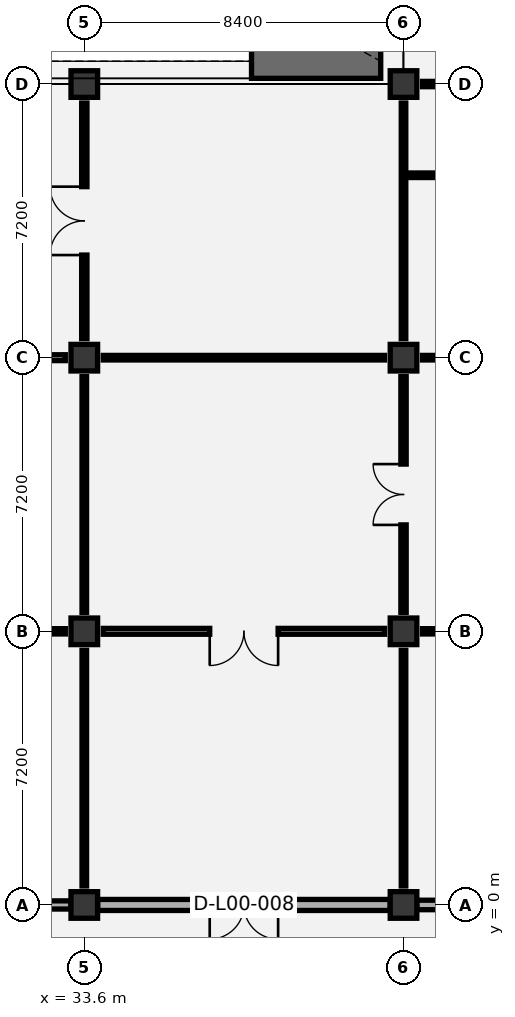
"""IFC4 building model, lengths in metres.
Left out: names, types, materials, properties, quantities, classifications, styles, units other than length and angle.
Written with IfcOpenShell. Run it as: python <this file> out.ifc"""

import sys

from ifc_helpers import new_model, si_unit, direction, frame, frame_2d, origin, origin_2d, place, context, subcontext, project, spatial, rectangle, extrude, element, fill, save


model = new_model("IFC4")
c1 = context("Model", 3, precision=1e-05, world=origin(), true_north=direction((0.0, 1.0)))
c2 = subcontext(c1, "Body", "Model", "MODEL_VIEW")
j1 = project(units=[si_unit("LENGTHUNIT", "METRE"), si_unit("PLANEANGLEUNIT", "RADIAN")], contexts=[c1])
p1 = place(None, origin())
s1 = spatial("IfcSite", under=j1, at=p1, CompositionType="ELEMENT")
p2 = place(p1, origin())
s2 = spatial("IfcBuilding", under=s1, at=p2, CompositionType="ELEMENT")
p3 = place(p2, origin())
s3 = spatial("IfcBuildingStorey", under=s2, at=p3, CompositionType="ELEMENT", Elevation=0.0)
for number, where, z_axis, x_axis in (
    (1, (33.6, 0.0, 0.0), (0.0, 0.0, 1.0), (1.0, 0.0, 0.0)),
    (2, (33.6, 7.2, 0.0), (0.0, 0.0, 1.0), (1.0, 0.0, 0.0)),
    (3, (33.6, 14.4, 0.0), (0.0, 0.0, 1.0), (1.0, 0.0, 0.0)),
    (4, (33.6, 21.6, 0.0), (0.0, 0.0, 1.0), (1.0, 0.0, 0.0)),
    (5, (42.0, 0.0, 0.0), (0.0, 0.0, 1.0), (1.0, 0.0, 0.0)),
    (6, (42.0, 7.2, 0.0), (0.0, 0.0, 1.0), (1.0, 0.0, 0.0)),
    (7, (42.0, 14.4, 0.0), (0.0, 0.0, 1.0), (1.0, 0.0, 0.0)),
    (8, (42.0, 21.6, 0.0), (0.0, 0.0, 1.0), (1.0, 0.0, 0.0)),
):
    element("IfcColumn", number, at=place(p3, frame(where, z_axis=z_axis, x_axis=x_axis)), inside=s3, PredefinedType="COLUMN", context=c2, shape_type="SweptSolid", body=[
        extrude(rectangle(XDim=0.7, YDim=0.7, at=origin_2d()), origin(), (0.0, 0.0, 1.0), 6.0),
    ])
p4 = place(p3, frame((17.4, 22.2, 0.0), z_axis=(0.0, 0.0, 1.0), x_axis=(1.0, 0.0, 0.0)))
e9 = element("IfcWall", 9, at=p4, inside=s3, PredefinedType="SOLIDWALL", context=c2, shape_type="SweptSolid", body=[
    extrude(rectangle(XDim=24.0, YDim=0.9, at=frame_2d((12.0, 0.0))), origin(), (0.0, 0.0, 1.0), 6.0),
])
p5 = place(p4, frame((2.4, 0.0, 0.8)))
e10 = element("IfcOpeningElement", 10, at=p5, cuts=e9, PredefinedType="OPENING", context=c2, shape_type="SweptSolid", body=[
    extrude(rectangle(XDim=6.4, YDim=3.2, at=frame_2d((3.2, 1.6))), frame((0.0, 0.46, 0.0), z_axis=(0.0, -1.0, 0.0), x_axis=(1.0, 0.0, 0.0)), (0.0, 0.0, 1.0), 0.92),
])
p6 = place(p4, frame((14.2, 0.0, 0.8)))
e11 = element("IfcOpeningElement", 11, at=p6, cuts=e9, PredefinedType="OPENING", context=c2, shape_type="SweptSolid", body=[
    extrude(rectangle(XDim=6.4, YDim=3.2, at=frame_2d((3.2, 1.6))), frame((0.0, 0.46, 0.0), z_axis=(0.0, -1.0, 0.0), x_axis=(1.0, 0.0, 0.0)), (0.0, 0.0, 1.0), 0.92),
])
p7 = place(p3, frame((25.55, 0.0, 0.0), z_axis=(0.0, 0.0, 1.0), x_axis=(1.0, 0.0, 0.0)))
e12 = element("IfcWall", 12, at=p7, inside=s3, PredefinedType="SOLIDWALL", context=c2, shape_type="SweptSolid", body=[
    extrude(rectangle(XDim=7.7, YDim=0.215, at=frame_2d((3.85, 0.0))), origin(), (0.0, 0.0, 1.0), 5.02),
])
p8 = place(p7, frame((2.85, 0.0, 0.0)))
e13 = element("IfcOpeningElement", 13, at=p8, cuts=e12, PredefinedType="OPENING", context=c2, shape_type="SweptSolid", body=[
    extrude(rectangle(XDim=2.0, YDim=2.4, at=frame_2d((1.0, 1.2))), frame((0.0, 0.117, 0.0), z_axis=(0.0, -1.0, 0.0), x_axis=(1.0, 0.0, 0.0)), (0.0, 0.0, 1.0), 0.235),
])
p9 = place(p3, frame((33.95, 0.0, 0.0), z_axis=(0.0, 0.0, 1.0), x_axis=(1.0, 0.0, 0.0)))
e14 = element("IfcWall", 14, at=p9, inside=s3, PredefinedType="SOLIDWALL", context=c2, shape_type="SweptSolid", body=[
    extrude(rectangle(XDim=7.7, YDim=0.29, at=frame_2d((3.85, 0.0))), origin(), (0.0, 0.0, 1.0), 5.02),
])
p10 = place(p9, frame((2.95, 0.0, 0.0)))
e15 = element("IfcOpeningElement", 15, at=p10, cuts=e14, PredefinedType="OPENING", context=c2, shape_type="SweptSolid", body=[
    extrude(rectangle(XDim=1.8, YDim=2.35, at=frame_2d((0.9, 1.175))), frame((0.0, 0.155, 0.0), z_axis=(0.0, -1.0, 0.0), x_axis=(1.0, 0.0, 0.0)), (0.0, 0.0, 1.0), 0.31),
])
p11 = place(p3, frame((42.35, 0.0, 0.0), z_axis=(0.0, 0.0, 1.0), x_axis=(1.0, 0.0, 0.0)))
e16 = element("IfcWall", 16, at=p11, inside=s3, PredefinedType="SOLIDWALL", context=c2, shape_type="SweptSolid", body=[
    extrude(rectangle(XDim=7.7, YDim=0.25, at=frame_2d((3.85, 0.0))), origin(), (0.0, 0.0, 1.0), 5.02),
])
p12 = place(p11, frame((3.05, 0.0, 0.0)))
e17 = element("IfcOpeningElement", 17, at=p12, cuts=e16, PredefinedType="OPENING", context=c2, shape_type="SweptSolid", body=[
    extrude(rectangle(XDim=1.6, YDim=2.25, at=frame_2d((0.8, 1.125))), frame((0.0, 0.135, 0.0), z_axis=(0.0, -1.0, 0.0), x_axis=(1.0, 0.0, 0.0)), (0.0, 0.0, 1.0), 0.27),
])
p13 = place(p3, frame((42.15, 19.2, 0.0), z_axis=(0.0, 0.0, 1.0), x_axis=(1.0, 0.0, 0.0)))
e18 = element("IfcWall", 18, at=p13, inside=s3, PredefinedType="PARTITIONING", context=c2, shape_type="SweptSolid", body=[
    extrude(rectangle(XDim=8.1, YDim=0.12, at=frame_2d((4.05, 0.0))), origin(), (0.0, 0.0, 1.0), 5.675),
])
p14 = place(p13, frame((1.08, 0.0, 0.0)))
e19 = element("IfcOpeningElement", 19, at=p14, cuts=e18, PredefinedType="OPENING", context=c2, shape_type="SweptSolid", body=[
    extrude(rectangle(XDim=0.95, YDim=2.1, at=frame_2d((0.475, 1.05))), frame((0.0, 0.07, 0.0), z_axis=(0.0, -1.0, 0.0), x_axis=(1.0, 0.0, 0.0)), (0.0, 0.0, 1.0), 0.14),
])
p15 = place(p13, frame((3.63, 0.0, 0.0)))
e20 = element("IfcOpeningElement", 20, at=p15, cuts=e18, PredefinedType="OPENING", context=c2, shape_type="SweptSolid", body=[
    extrude(rectangle(XDim=0.9, YDim=2.1, at=frame_2d((0.45, 1.05))), frame((0.0, 0.07, 0.0), z_axis=(0.0, -1.0, 0.0), x_axis=(1.0, 0.0, 0.0)), (0.0, 0.0, 1.0), 0.14),
])
p16 = place(p13, frame((6.13, 0.0, 0.0)))
e21 = element("IfcOpeningElement", 21, at=p16, cuts=e18, PredefinedType="OPENING", context=c2, shape_type="SweptSolid", body=[
    extrude(rectangle(XDim=1.0, YDim=2.1, at=frame_2d((0.5, 1.05))), frame((0.0, 0.07, 0.0), z_axis=(0.0, -1.0, 0.0), x_axis=(1.0, 0.0, 0.0)), (0.0, 0.0, 1.0), 0.14),
])
p17 = place(p3, frame((33.6, 0.5, 0.0), z_axis=(0.0, 0.0, 1.0), x_axis=(0.0, 1.0, 0.0)))
e22 = element("IfcWall", 22, at=p17, inside=s3, PredefinedType="PARTITIONING", context=c2, shape_type="SweptSolid", body=[
    extrude(rectangle(XDim=6.2, YDim=0.12, at=frame_2d((3.1, 0.0))), origin(), (0.0, 0.0, 1.0), 5.17),
])
p18 = place(p3, frame((25.7, 7.2, 0.0), z_axis=(0.0, 0.0, 1.0), x_axis=(1.0, 0.0, 0.0)))
e23 = element("IfcWall", 23, at=p18, inside=s3, PredefinedType="PARTITIONING", context=c2, shape_type="SweptSolid", body=[
    extrude(rectangle(XDim=7.4, YDim=0.14, at=frame_2d((3.7, 0.0))), origin(), (0.0, 0.0, 1.0), 4.87),
])
p19 = place(p18, frame((2.8, 0.0, 0.0)))
e24 = element("IfcOpeningElement", 24, at=p19, cuts=e23, PredefinedType="OPENING", context=c2, shape_type="SweptSolid", body=[
    extrude(rectangle(XDim=1.8, YDim=2.25, at=frame_2d((0.9, 1.125))), frame((0.0, 0.08, 0.0), z_axis=(0.0, -1.0, 0.0), x_axis=(1.0, 0.0, 0.0)), (0.0, 0.0, 1.0), 0.16),
])
p20 = place(p3, frame((33.6, 7.7, 0.0), z_axis=(0.0, 0.0, 1.0), x_axis=(0.0, 1.0, 0.0)))
e25 = element("IfcWall", 25, at=p20, inside=s3, PredefinedType="PARTITIONING", context=c2, shape_type="SweptSolid", body=[
    extrude(rectangle(XDim=6.2, YDim=0.12, at=frame_2d((3.1, 0.0))), origin(), (0.0, 0.0, 1.0), 4.92),
])
p21 = place(p3, frame((25.7, 14.4, 0.0), z_axis=(0.0, 0.0, 1.0), x_axis=(1.0, 0.0, 0.0)))
e26 = element("IfcWall", 26, at=p21, inside=s3, PredefinedType="PARTITIONING", context=c2, shape_type="SweptSolid", body=[
    extrude(rectangle(XDim=7.4, YDim=0.155, at=frame_2d((3.7, 0.0))), origin(), (0.0, 0.0, 1.0), 5.02),
])
p22 = place(p21, frame((2.9, 0.0, 0.0)))
e27 = element("IfcOpeningElement", 27, at=p22, cuts=e26, PredefinedType="OPENING", context=c2, shape_type="SweptSolid", body=[
    extrude(rectangle(XDim=1.6, YDim=2.2, at=frame_2d((0.8, 1.1))), frame((0.0, 0.087, 0.0), z_axis=(0.0, -1.0, 0.0), x_axis=(1.0, 0.0, 0.0)), (0.0, 0.0, 1.0), 0.175),
])
p23 = place(p3, frame((33.6, 14.9, 0.0), z_axis=(0.0, 0.0, 1.0), x_axis=(0.0, 1.0, 0.0)))
e28 = element("IfcWall", 28, at=p23, inside=s3, PredefinedType="PARTITIONING", context=c2, shape_type="SweptSolid", body=[
    extrude(rectangle(XDim=6.2, YDim=0.14, at=frame_2d((3.1, 0.0))), origin(), (0.0, 0.0, 1.0), 5.775),
])
p24 = place(p23, frame((2.2, 0.0, 0.0)))
e29 = element("IfcOpeningElement", 29, at=p24, cuts=e28, PredefinedType="OPENING", context=c2, shape_type="SweptSolid", body=[
    extrude(rectangle(XDim=1.8, YDim=2.25, at=frame_2d((0.9, 1.125))), frame((0.0, 0.08, 0.0), z_axis=(0.0, -1.0, 0.0), x_axis=(1.0, 0.0, 0.0)), (0.0, 0.0, 1.0), 0.16),
])
p25 = place(p3, frame((42.0, 0.5, 0.0), z_axis=(0.0, 0.0, 1.0), x_axis=(0.0, 1.0, 0.0)))
e30 = element("IfcWall", 30, at=p25, inside=s3, PredefinedType="PARTITIONING", context=c2, shape_type="SweptSolid", body=[
    extrude(rectangle(XDim=6.2, YDim=0.12, at=frame_2d((3.1, 0.0))), origin(), (0.0, 0.0, 1.0), 4.92),
])
p26 = place(p3, frame((34.1, 7.2, 0.0), z_axis=(0.0, 0.0, 1.0), x_axis=(1.0, 0.0, 0.0)))
e31 = element("IfcWall", 31, at=p26, inside=s3, PredefinedType="PARTITIONING", context=c2, shape_type="SweptSolid", body=[
    extrude(rectangle(XDim=7.4, YDim=0.155, at=frame_2d((3.7, 0.0))), origin(), (0.0, 0.0, 1.0), 4.87),
])
p27 = place(p26, frame((2.8, 0.0, 0.0)))
e32 = element("IfcOpeningElement", 32, at=p27, cuts=e31, PredefinedType="OPENING", context=c2, shape_type="SweptSolid", body=[
    extrude(rectangle(XDim=1.8, YDim=2.25, at=frame_2d((0.9, 1.125))), frame((0.0, 0.087, 0.0), z_axis=(0.0, -1.0, 0.0), x_axis=(1.0, 0.0, 0.0)), (0.0, 0.0, 1.0), 0.175),
])
p28 = place(p3, frame((42.0, 7.7, 0.0), z_axis=(0.0, 0.0, 1.0), x_axis=(0.0, 1.0, 0.0)))
e33 = element("IfcWall", 33, at=p28, inside=s3, PredefinedType="PARTITIONING", context=c2, shape_type="SweptSolid", body=[
    extrude(rectangle(XDim=6.2, YDim=0.14, at=frame_2d((3.1, 0.0))), origin(), (0.0, 0.0, 1.0), 5.27),
])
p29 = place(p28, frame((2.3, 0.0, 0.0)))
e34 = element("IfcOpeningElement", 34, at=p29, cuts=e33, PredefinedType="OPENING", context=c2, shape_type="SweptSolid", body=[
    extrude(rectangle(XDim=1.6, YDim=2.2, at=frame_2d((0.8, 1.1))), frame((0.0, 0.08, 0.0), z_axis=(0.0, -1.0, 0.0), x_axis=(1.0, 0.0, 0.0)), (0.0, 0.0, 1.0), 0.16),
])
p30 = place(p3, frame((34.1, 14.4, 0.0), z_axis=(0.0, 0.0, 1.0), x_axis=(1.0, 0.0, 0.0)))
e35 = element("IfcWall", 35, at=p30, inside=s3, PredefinedType="PARTITIONING", context=c2, shape_type="SweptSolid", body=[
    extrude(rectangle(XDim=7.4, YDim=0.12, at=frame_2d((3.7, 0.0))), origin(), (0.0, 0.0, 1.0), 5.02),
])
p31 = place(p3, frame((42.0, 14.9, 0.0), z_axis=(0.0, 0.0, 1.0), x_axis=(0.0, 1.0, 0.0)))
e36 = element("IfcWall", 36, at=p31, inside=s3, PredefinedType="PARTITIONING", context=c2, shape_type="SweptSolid", body=[
    extrude(rectangle(XDim=6.2, YDim=0.12, at=frame_2d((3.1, 0.0))), origin(), (0.0, 0.0, 1.0), 5.02),
])
p32 = place(p3, frame((42.5, 7.2, 0.0), z_axis=(0.0, 0.0, 1.0), x_axis=(1.0, 0.0, 0.0)))
e37 = element("IfcWall", 37, at=p32, inside=s3, PredefinedType="PARTITIONING", context=c2, shape_type="SweptSolid", body=[
    extrude(rectangle(XDim=7.4, YDim=0.14, at=frame_2d((3.7, 0.0))), origin(), (0.0, 0.0, 1.0), 4.87),
])
p33 = place(p32, frame((2.8, 0.0, 0.0)))
e38 = element("IfcOpeningElement", 38, at=p33, cuts=e37, PredefinedType="OPENING", context=c2, shape_type="SweptSolid", body=[
    extrude(rectangle(XDim=1.8, YDim=2.25, at=frame_2d((0.9, 1.125))), frame((0.0, 0.08, 0.0), z_axis=(0.0, -1.0, 0.0), x_axis=(1.0, 0.0, 0.0)), (0.0, 0.0, 1.0), 0.16),
])
p34 = place(p3, frame((42.5, 14.4, 0.0), z_axis=(0.0, 0.0, 1.0), x_axis=(1.0, 0.0, 0.0)))
e39 = element("IfcWall", 39, at=p34, inside=s3, PredefinedType="PARTITIONING", context=c2, shape_type="SweptSolid", body=[
    extrude(rectangle(XDim=7.4, YDim=0.12, at=frame_2d((3.7, 0.0))), origin(), (0.0, 0.0, 1.0), 4.87),
])
p35 = place(p3, frame((42.5, 21.6, 0.0), z_axis=(0.0, 0.0, 1.0), x_axis=(1.0, 0.0, 0.0)))
e40 = element("IfcWall", 40, at=p35, inside=s3, PredefinedType="PARTITIONING", context=c2, shape_type="SweptSolid", body=[
    extrude(rectangle(XDim=7.4, YDim=0.14, at=frame_2d((3.7, 0.0))), origin(), (0.0, 0.0, 1.0), 4.87),
])
p36 = place(p35, frame((2.8, 0.0, 0.0)))
e41 = element("IfcOpeningElement", 41, at=p36, cuts=e40, PredefinedType="OPENING", context=c2, shape_type="SweptSolid", body=[
    extrude(rectangle(XDim=1.8, YDim=2.25, at=frame_2d((0.9, 1.125))), frame((0.0, 0.08, 0.0), z_axis=(0.0, -1.0, 0.0), x_axis=(1.0, 0.0, 0.0)), (0.0, 0.0, 1.0), 0.16),
])
p37 = place(p10, frame((1.8, 0.0, 0.0), z_axis=(0.0, 0.0, 1.0), x_axis=(-1.0, 0.0, 0.0)))
e42 = element("IfcDoor", 42, at=p37, inside=s3, OperationType="DOUBLE_DOOR_SINGLE_SWING", PredefinedType="DOOR", context=c2, shape_type="SweptSolid", body=[
    extrude(rectangle(XDim=1.8, YDim=2.35, at=frame_2d((0.9, 1.175))), frame((0.0, 0.025, 0.0), z_axis=(0.0, -1.0, 0.0), x_axis=(1.0, 0.0, 0.0)), (0.0, 0.0, 1.0), 0.05),
])
fill(e15, e42)
p38 = place(p6, origin())
e43 = element("IfcWindow", 43, at=p38, inside=s3, PartitioningType="SINGLE_PANEL", PredefinedType="WINDOW", context=c2, shape_type="SweptSolid", body=[
    extrude(rectangle(XDim=6.4, YDim=3.2, at=frame_2d((3.2, 1.6))), frame((0.0, 0.175, 0.0), z_axis=(0.0, -1.0, 0.0), x_axis=(1.0, 0.0, 0.0)), (0.0, 0.0, 1.0), 0.35),
])
fill(e11, e43)
p39 = place(p24, origin())
e44 = element("IfcDoor", 44, at=p39, inside=s3, OperationType="DOUBLE_DOOR_SINGLE_SWING", PredefinedType="DOOR", context=c2, shape_type="SweptSolid", body=[
    extrude(rectangle(XDim=1.8, YDim=2.25, at=frame_2d((0.9, 1.125))), frame((0.0, 0.025, 0.0), z_axis=(0.0, -1.0, 0.0), x_axis=(1.0, 0.0, 0.0)), (0.0, 0.0, 1.0), 0.05),
])
fill(e29, e44)
p40 = place(p27, frame((1.8, 0.0, 0.0), z_axis=(0.0, 0.0, 1.0), x_axis=(-1.0, 0.0, 0.0)))
e45 = element("IfcDoor", 45, at=p40, inside=s3, OperationType="DOUBLE_DOOR_SINGLE_SWING", PredefinedType="DOOR", context=c2, shape_type="SweptSolid", body=[
    extrude(rectangle(XDim=1.8, YDim=2.25, at=frame_2d((0.9, 1.125))), frame((0.0, 0.025, 0.0), z_axis=(0.0, -1.0, 0.0), x_axis=(1.0, 0.0, 0.0)), (0.0, 0.0, 1.0), 0.05),
])
fill(e32, e45)
p41 = place(p29, origin())
e46 = element("IfcDoor", 46, at=p41, inside=s3, OperationType="DOUBLE_DOOR_SINGLE_SWING", PredefinedType="DOOR", context=c2, shape_type="SweptSolid", body=[
    extrude(rectangle(XDim=1.6, YDim=2.2, at=frame_2d((0.8, 1.1))), frame((0.0, 0.025, 0.0), z_axis=(0.0, -1.0, 0.0), x_axis=(1.0, 0.0, 0.0)), (0.0, 0.0, 1.0), 0.05),
])
fill(e34, e46)
save(model, sys.argv[1])
